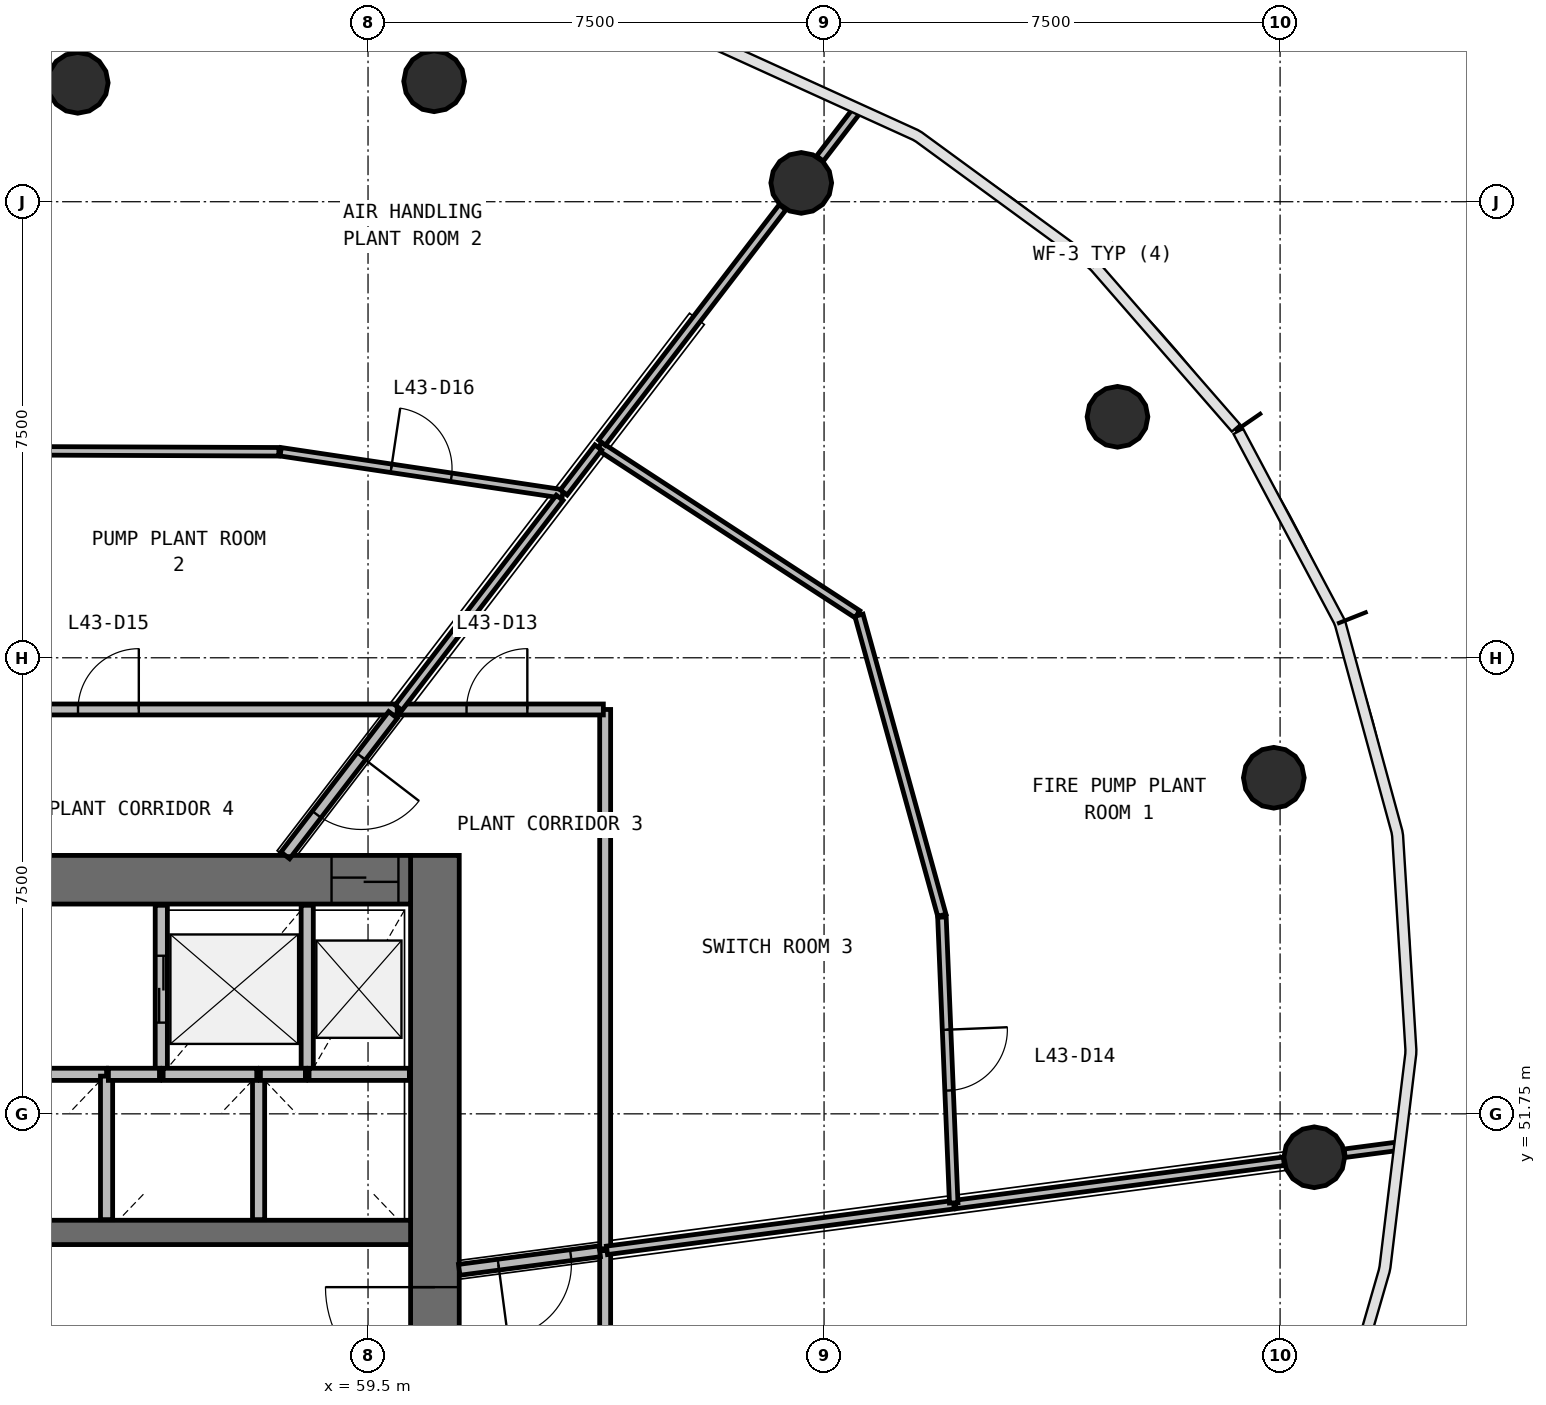
"""IFC4 building model, lengths in metres.
Left out: names, types, materials, properties, quantities, classifications, styles, units other than length and angle.
Written with IfcOpenShell. Run it as: python <this file> out.ifc"""

import sys

from ifc_helpers import new_model, si_unit, direction, frame, frame_2d, origin, origin_2d, place, context, subcontext, project, spatial, rectangle, circle, extrude, source, transform, mapped, element, fill, save


model = new_model("IFC4")
c1 = context("Model", 3, precision=1e-05, world=origin(), true_north=direction((0.0, 1.0)))
c2 = subcontext(c1, "Body", "Model", "MODEL_VIEW")
j1 = project(units=[si_unit("LENGTHUNIT", "METRE"), si_unit("PLANEANGLEUNIT", "RADIAN")], contexts=[c1])
p1 = place(None, origin())
s1 = spatial("IfcSite", under=j1, at=p1, CompositionType="ELEMENT")
p2 = place(p1, origin())
s2 = spatial("IfcBuilding", under=s1, at=p2, CompositionType="ELEMENT")
p3 = place(p2, frame((0.0, 0.0, 179.9)))
s3 = spatial("IfcBuildingStorey", under=s2, at=p3, CompositionType="ELEMENT", Elevation=179.9)
p4 = place(p3, frame((60.6, 40.0, 0.0), z_axis=(0.0, 0.0, 1.0), x_axis=(0.0, 1.0, 0.0)))
e1 = element("IfcWall", 1, at=p4, inside=s3, PredefinedType="SHEAR", context=c2, shape_type="SweptSolid", body=[
    extrude(rectangle(XDim=16.0, YDim=0.8, at=frame_2d((8.0, 0.0))), origin(), (0.0, 0.0, 1.0), 3.9),
])
p5 = place(p4, frame((7.1, 0.0, 0.0)))
e2 = element("IfcOpeningElement", 2, at=p5, cuts=e1, PredefinedType="OPENING", context=c2, shape_type="SweptSolid", body=[
    extrude(rectangle(XDim=1.8, YDim=2.1, at=frame_2d((0.9, 1.05))), frame((0.0, 0.41, 0.0), z_axis=(0.0, -1.0, 0.0), x_axis=(1.0, 0.0, 0.0)), (0.0, 0.0, 1.0), 0.82),
])
p6 = place(p3, frame((60.2, 55.6, 0.0), z_axis=(0.0, 0.0, 1.0), x_axis=(-1.0, 0.0, 0.0)))
e3 = element("IfcWall", 3, at=p6, inside=s3, PredefinedType="SHEAR", context=c2, shape_type="SweptSolid", body=[
    extrude(rectangle(XDim=16.4, YDim=0.8, at=frame_2d((8.2, 0.0))), origin(), (0.0, 0.0, 1.0), 3.9),
])
p7 = place(p6, frame((0.2, 0.0, 0.0)))
e4 = element("IfcOpeningElement", 4, at=p7, cuts=e3, PredefinedType="OPENING", context=c2, shape_type="SweptSolid", body=[
    extrude(rectangle(XDim=1.1, YDim=2.1, at=frame_2d((0.55, 1.05))), frame((0.0, 0.41, 0.0), z_axis=(0.0, -1.0, 0.0), x_axis=(1.0, 0.0, 0.0)), (0.0, 0.0, 1.0), 0.82),
])
p8 = place(p6, frame((10.1, 0.0, 0.0)))
e5 = element("IfcOpeningElement", 5, at=p8, cuts=e3, PredefinedType="OPENING", context=c2, shape_type="SweptSolid", body=[
    extrude(rectangle(XDim=1.2, YDim=2.1, at=frame_2d((0.6, 1.05))), frame((0.0, 0.41, 0.0), z_axis=(0.0, -1.0, 0.0), x_axis=(1.0, 0.0, 0.0)), (0.0, 0.0, 1.0), 0.82),
])
p9 = place(p6, frame((7.05, 0.0, 0.0)))
e6 = element("IfcOpeningElement", 6, at=p9, cuts=e3, PredefinedType="OPENING", context=c2, shape_type="SweptSolid", body=[
    extrude(rectangle(XDim=1.1, YDim=2.1, at=frame_2d((0.55, 1.05))), frame((0.0, 0.41, 0.0), z_axis=(0.0, -1.0, 0.0), x_axis=(1.0, 0.0, 0.0)), (0.0, 0.0, 1.0), 0.82),
])
p10 = place(p3, frame((43.8, 49.8, 0.0), z_axis=(0.0, 0.0, 1.0), x_axis=(1.0, 0.0, 0.0)))
e7 = element("IfcWall", 7, at=p10, inside=s3, PredefinedType="SHEAR", context=c2, shape_type="SweptSolid", body=[
    extrude(rectangle(XDim=16.4, YDim=0.4, at=frame_2d((8.2, 0.0))), origin(), (0.0, 0.0, 1.0), 3.9),
])
p11 = place(p10, frame((3.45, 0.0, 0.0)))
e8 = element("IfcOpeningElement", 8, at=p11, cuts=e7, PredefinedType="OPENING", context=c2, shape_type="SweptSolid", body=[
    extrude(rectangle(XDim=0.9, YDim=2.1, at=frame_2d((0.45, 1.05))), frame((0.0, 0.21, 0.0), z_axis=(0.0, -1.0, 0.0), x_axis=(1.0, 0.0, 0.0)), (0.0, 0.0, 1.0), 0.42),
])
p12 = place(p10, frame((7.65, 0.0, 0.0)))
e9 = element("IfcOpeningElement", 9, at=p12, cuts=e7, PredefinedType="OPENING", context=c2, shape_type="SweptSolid", body=[
    extrude(rectangle(XDim=0.9, YDim=2.1, at=frame_2d((0.45, 1.05))), frame((0.0, 0.21, 0.0), z_axis=(0.0, -1.0, 0.0), x_axis=(1.0, 0.0, 0.0)), (0.0, 0.0, 1.0), 0.42),
])
m1 = source(origin(), c2, "Body", "SweptSolid", [
    extrude(circle(Radius=0.5, at=origin_2d()), origin(), (0.0, 0.0, 1.0), 3.58),
])
for number, where, z_axis, x_axis in (
    (10, (75.062, 51.036, 0.0), (0.0, 0.0, 1.0), (1.0, 0.0, 0.0)),
    (11, (74.397, 57.277, 0.0), (0.0, 0.0, 1.0), (1.0, 0.0, 0.0)),
    (12, (71.826, 63.213, 0.0), (0.0, 0.0, 1.0), (1.0, 0.0, 0.0)),
    (13, (66.625, 67.06, 0.0), (0.0, 0.0, 1.0), (1.0, 0.0, 0.0)),
    (14, (60.587, 68.731, 0.0), (0.0, 0.0, 1.0), (1.0, 0.0, 0.0)),
    (15, (54.726, 68.705, 0.0), (0.0, 0.0, 1.0), (1.0, 0.0, 0.0)),
):
    element("IfcColumn", number, at=place(p3, frame(where, z_axis=z_axis, x_axis=x_axis)), inside=s3, PredefinedType="COLUMN", context=c2, shape_type="MappedRepresentation", body=[
        mapped(m1, transform((0.0, 0.0, 0.0), scale=1.0)),
    ])
p13 = place(p3, frame((56.1, 55.18, 0.0), z_axis=(0.0, 0.0, 1.0), x_axis=(0.0, -1.0, 0.0)))
e16 = element("IfcWall", 16, at=p13, inside=s3, PredefinedType="SOLIDWALL", context=c2, shape_type="SweptSolid", body=[
    extrude(rectangle(XDim=2.78, YDim=0.2, at=frame_2d((1.39, 0.0))), origin(), (0.0, 0.0, 1.0), 3.58),
])
p14 = place(p13, frame((0.83, 0.0, 0.0)))
e17 = element("IfcOpeningElement", 17, at=p14, cuts=e16, PredefinedType="OPENING", context=c2, shape_type="SweptSolid", body=[
    extrude(rectangle(XDim=1.1, YDim=2.1, at=frame_2d((0.55, 1.05))), frame((0.0, 0.11, 0.0), z_axis=(0.0, -1.0, 0.0), x_axis=(1.0, 0.0, 0.0)), (0.0, 0.0, 1.0), 0.22),
])
p15 = place(p3, frame((58.5, 52.4, 0.0), z_axis=(0.0, 0.0, 1.0), x_axis=(0.0, 1.0, 0.0)))
e18 = element("IfcWall", 18, at=p15, inside=s3, PredefinedType="SOLIDWALL", context=c2, shape_type="SweptSolid", body=[
    extrude(rectangle(XDim=2.78, YDim=0.2, at=frame_2d((1.39, 0.0))), origin(), (0.0, 0.0, 1.0), 3.58),
])
p16 = place(p3, frame((55.2, 52.4, 0.0), z_axis=(0.0, 0.0, 1.0), x_axis=(-1.0, 0.0, 0.0)))
e19 = element("IfcWall", 19, at=p16, inside=s3, PredefinedType="SOLIDWALL", context=c2, shape_type="SweptSolid", body=[
    extrude(rectangle(XDim=2.5, YDim=0.2, at=frame_2d((1.25, 0.0))), origin(), (0.0, 0.0, 1.0), 3.58),
])
p17 = place(p3, frame((55.2, 50.01, 0.0), z_axis=(0.0, 0.0, 1.0), x_axis=(0.0, 1.0, 0.0)))
e20 = element("IfcWall", 20, at=p17, inside=s3, PredefinedType="SOLIDWALL", context=c2, shape_type="SweptSolid", body=[
    extrude(rectangle(XDim=2.36, YDim=0.2, at=frame_2d((1.18, 0.0))), origin(), (0.0, 0.0, 1.0), 3.58),
])
p18 = place(p3, frame((57.7, 50.01, 0.0), z_axis=(0.0, 0.0, 1.0), x_axis=(0.0, 1.0, 0.0)))
e21 = element("IfcWall", 21, at=p18, inside=s3, PredefinedType="SOLIDWALL", context=c2, shape_type="SweptSolid", body=[
    extrude(rectangle(XDim=2.39, YDim=0.2, at=frame_2d((1.195, 0.0))), origin(), (0.0, 0.0, 1.0), 3.58),
])
p19 = place(p3, frame((60.18, 52.4, 0.0), z_axis=(0.0, 0.0, 1.0), x_axis=(-1.0, 0.0, 0.0)))
e22 = element("IfcWall", 22, at=p19, inside=s3, PredefinedType="SOLIDWALL", context=c2, shape_type="SweptSolid", body=[
    extrude(rectangle(XDim=1.65, YDim=0.2, at=frame_2d((0.825, 0.0))), origin(), (0.0, 0.0, 1.0), 3.58),
])
p20 = place(p3, frame((57.67, 52.4, 0.0), z_axis=(0.0, 0.0, 1.0), x_axis=(-1.0, 0.0, 0.0)))
e23 = element("IfcWall", 23, at=p20, inside=s3, PredefinedType="SOLIDWALL", context=c2, shape_type="SweptSolid", body=[
    extrude(rectangle(XDim=1.54, YDim=0.2, at=frame_2d((0.77, 0.0))), origin(), (0.0, 0.0, 1.0), 3.58),
])
p21 = place(p3, frame((56.07, 52.4, 0.0), z_axis=(0.0, 0.0, 1.0), x_axis=(-1.0, 0.0, 0.0)))
e24 = element("IfcWall", 24, at=p21, inside=s3, PredefinedType="SOLIDWALL", context=c2, shape_type="SweptSolid", body=[
    extrude(rectangle(XDim=0.84, YDim=0.2, at=frame_2d((0.42, 0.0))), origin(), (0.0, 0.0, 1.0), 3.58),
])
p22 = place(p3, frame((58.47, 52.4, 0.0), z_axis=(0.0, 0.0, 1.0), x_axis=(-1.0, 0.0, 0.0)))
e25 = element("IfcWall", 25, at=p22, inside=s3, PredefinedType="SOLIDWALL", context=c2, shape_type="SweptSolid", body=[
    extrude(rectangle(XDim=0.74, YDim=0.2, at=frame_2d((0.37, 0.0))), origin(), (0.0, 0.0, 1.0), 3.58),
])
p23 = place(p3, frame((63.4, 49.501, 0.0), z_axis=(0.0, 0.0, 1.0), x_axis=(0.0, -1.0, 0.0)))
e26 = element("IfcWall", 26, at=p23, inside=s3, PredefinedType="PARTITIONING", context=c2, shape_type="SweptSolid", body=[
    extrude(rectangle(XDim=10.248, YDim=0.18, at=frame_2d((5.124, 0.0))), origin(), (0.0, 0.0, 1.0), 2.38),
])
p24 = place(p23, frame((4.598, 0.0, 0.0)))
e27 = element("IfcOpeningElement", 27, at=p24, cuts=e26, PredefinedType="OPENING", context=c2, shape_type="SweptSolid", body=[
    extrude(rectangle(XDim=1.0, YDim=2.1, at=frame_2d((0.5, 1.05))), frame((0.0, 0.1, 0.0), z_axis=(0.0, -1.0, 0.0), x_axis=(1.0, 0.0, 0.0)), (0.0, 0.0, 1.0), 0.2),
])
p25 = place(p3, frame((50.661, 58.4, 0.0), z_axis=(0.0, 0.0, 1.0), x_axis=(1.0, 0.0, 0.0)))
e28 = element("IfcWall", 28, at=p25, inside=s3, PredefinedType="PARTITIONING", context=c2, shape_type="SweptSolid", body=[
    extrude(rectangle(XDim=9.319, YDim=0.18, at=frame_2d((4.66, 0.0))), origin(), (0.0, 0.0, 1.0), 2.38),
])
p26 = place(p25, frame((4.069, 0.0, 0.0)))
e29 = element("IfcOpeningElement", 29, at=p26, cuts=e28, PredefinedType="OPENING", context=c2, shape_type="SweptSolid", body=[
    extrude(rectangle(XDim=1.0, YDim=2.1, at=frame_2d((0.5, 1.05))), frame((0.0, 0.1, 0.0), z_axis=(0.0, -1.0, 0.0), x_axis=(1.0, 0.0, 0.0)), (0.0, 0.0, 1.0), 0.2),
])
p27 = place(p3, frame((63.4, 49.531, 0.0), z_axis=(0.0, 0.0, 1.0), x_axis=(0.0, 1.0, 0.0)))
e30 = element("IfcWall", 30, at=p27, inside=s3, PredefinedType="PARTITIONING", context=c2, shape_type="SweptSolid", body=[
    extrude(rectangle(XDim=8.869, YDim=0.18, at=frame_2d((4.435, 0.0))), origin(), (0.0, 0.0, 1.0), 2.38),
])
p28 = place(p3, frame((60.01, 58.4, 0.0), z_axis=(0.0, 0.0, 1.0), x_axis=(1.0, 0.0, 0.0)))
e31 = element("IfcWall", 31, at=p28, inside=s3, PredefinedType="PARTITIONING", context=c2, shape_type="SweptSolid", body=[
    extrude(rectangle(XDim=3.36, YDim=0.18, at=frame_2d((1.68, 0.0))), origin(), (0.0, 0.0, 1.0), 2.38),
])
p29 = place(p28, frame((1.11, 0.0, 0.0)))
e32 = element("IfcOpeningElement", 32, at=p29, cuts=e31, PredefinedType="OPENING", context=c2, shape_type="SweptSolid", body=[
    extrude(rectangle(XDim=1.0, YDim=2.1, at=frame_2d((0.5, 1.05))), frame((0.0, 0.1, 0.0), z_axis=(0.0, -1.0, 0.0), x_axis=(1.0, 0.0, 0.0)), (0.0, 0.0, 1.0), 0.2),
])
p30 = place(p3, frame((59.911, 58.31, 0.0), z_axis=(0.0, 0.0, 1.0), x_axis=(-0.608737787706, -0.793371480341, 0.0)))
e33 = element("IfcWall", 33, at=p30, inside=s3, PredefinedType="PARTITIONING", context=c2, shape_type="SweptSolid", body=[
    extrude(rectangle(XDim=2.912, YDim=0.18, at=frame_2d((1.456, 0.0))), origin(), (0.0, 0.0, 1.0), 2.38),
])
p31 = place(p30, frame((0.862, 0.0, 0.0)))
e34 = element("IfcOpeningElement", 34, at=p31, cuts=e33, PredefinedType="OPENING", context=c2, shape_type="SweptSolid", body=[
    extrude(rectangle(XDim=1.2, YDim=2.1, at=frame_2d((0.6, 1.05))), frame((0.0, 0.1, 0.0), z_axis=(0.0, -1.0, 0.0), x_axis=(1.0, 0.0, 0.0)), (0.0, 0.0, 1.0), 0.2),
])
p32 = place(p3, frame((63.31, 49.489, 0.0), z_axis=(0.0, 0.0, 1.0), x_axis=(-0.991440737811, -0.130557509967, 0.0)))
e35 = element("IfcWall", 35, at=p32, inside=s3, PredefinedType="PARTITIONING", context=c2, shape_type="SweptSolid", body=[
    extrude(rectangle(XDim=2.33, YDim=0.18, at=frame_2d((1.165, 0.0))), origin(), (0.0, 0.0, 1.0), 2.38),
])
p33 = place(p32, frame((0.48, 0.0, 0.0)))
e36 = element("IfcOpeningElement", 36, at=p33, cuts=e35, PredefinedType="OPENING", context=c2, shape_type="SweptSolid", body=[
    extrude(rectangle(XDim=1.2, YDim=2.1, at=frame_2d((0.6, 1.05))), frame((0.0, 0.1, 0.0), z_axis=(0.0, -1.0, 0.0), x_axis=(1.0, 0.0, 0.0)), (0.0, 0.0, 1.0), 0.2),
])
p34 = place(p3, frame((63.43, 49.505, 0.0), z_axis=(0.0, 0.0, 1.0), x_axis=(0.991449239368, 0.130492933744, 0.0)))
e37 = element("IfcWall", 37, at=p34, inside=s3, PredefinedType="PARTITIONING", context=c2, shape_type="SweptSolid", body=[
    extrude(rectangle(XDim=5.753, YDim=0.14, at=frame_2d((2.876, 0.0))), origin(), (0.0, 0.0, 1.0), 2.38),
])
p35 = place(p3, frame((69.163, 50.26, 0.0), z_axis=(0.0, 0.0, 1.0), x_axis=(0.99144696925, 0.130510180315, 0.0)))
e38 = element("IfcWall", 38, at=p35, inside=s3, PredefinedType="PARTITIONING", context=c2, shape_type="SweptSolid", body=[
    extrude(rectangle(XDim=5.446, YDim=0.14, at=frame_2d((2.723, 0.0))), origin(), (0.0, 0.0, 1.0), 2.38),
])
p36 = place(p3, frame((68.937, 55.016, 0.0), z_axis=(0.0, 0.0, 1.0), x_axis=(-0.266340043195, 0.963879132148, 0.0)))
e39 = element("IfcWall", 39, at=p36, inside=s3, PredefinedType="PARTITIONING", context=c2, shape_type="SweptSolid", body=[
    extrude(rectangle(XDim=5.119, YDim=0.14, at=frame_2d((2.56, 0.0))), origin(), (0.0, 0.0, 1.0), 2.38),
])
p37 = place(p3, frame((67.549, 59.967, 0.0), z_axis=(0.0, 0.0, 1.0), x_axis=(-0.837722756829, 0.546095763297, 0.0)))
e40 = element("IfcWall", 40, at=p37, inside=s3, PredefinedType="PARTITIONING", context=c2, shape_type="SweptSolid", body=[
    extrude(rectangle(XDim=5.066, YDim=0.14, at=frame_2d((2.533, 0.0))), origin(), (0.0, 0.0, 1.0), 2.38),
])
p38 = place(p3, frame((63.348, 62.789, 0.0), z_axis=(0.0, 0.0, 1.0), x_axis=(0.608786560107, 0.793334055889, 0.0)))
e41 = element("IfcWall", 41, at=p38, inside=s3, PredefinedType="PARTITIONING", context=c2, shape_type="SweptSolid", body=[
    extrude(rectangle(XDim=4.879, YDim=0.14, at=frame_2d((2.439, 0.0))), origin(), (0.0, 0.0, 1.0), 2.38),
])
p39 = place(p3, frame((68.938, 54.986, 0.0), z_axis=(0.0, 0.0, 1.0), x_axis=(0.041209574391, -0.999150524685, 0.0)))
e42 = element("IfcWall", 42, at=p39, inside=s3, PredefinedType="PARTITIONING", context=c2, shape_type="SweptSolid", body=[
    extrude(rectangle(XDim=4.704, YDim=0.14, at=frame_2d((2.352, 0.0))), origin(), (0.0, 0.0, 1.0), 2.38),
])
p40 = place(p39, frame((1.854, 0.0, 0.0)))
e43 = element("IfcOpeningElement", 43, at=p40, cuts=e42, PredefinedType="OPENING", context=c2, shape_type="SweptSolid", body=[
    extrude(rectangle(XDim=1.0, YDim=2.1, at=frame_2d((0.5, 1.05))), frame((0.0, 0.08, 0.0), z_axis=(0.0, -1.0, 0.0), x_axis=(1.0, 0.0, 0.0)), (0.0, 0.0, 1.0), 0.16),
])
p41 = place(p3, frame((58.063, 62.638, 0.0), z_axis=(0.0, 0.0, 1.0), x_axis=(0.989020980415, -0.147775168075, 0.0)))
e44 = element("IfcWall", 44, at=p41, inside=s3, PredefinedType="PARTITIONING", context=c2, shape_type="SweptSolid", body=[
    extrude(rectangle(XDim=4.689, YDim=0.14, at=frame_2d((2.344, 0.0))), origin(), (0.0, 0.0, 1.0), 2.38),
])
p42 = place(p41, frame((1.839, 0.0, 0.0)))
e45 = element("IfcOpeningElement", 45, at=p42, cuts=e44, PredefinedType="OPENING", context=c2, shape_type="SweptSolid", body=[
    extrude(rectangle(XDim=1.0, YDim=2.1, at=frame_2d((0.5, 1.05))), frame((0.0, 0.08, 0.0), z_axis=(0.0, -1.0, 0.0), x_axis=(1.0, 0.0, 0.0)), (0.0, 0.0, 1.0), 0.16),
])
p43 = place(p3, frame((60.002, 58.429, 0.0), z_axis=(0.0, 0.0, 1.0), x_axis=(0.608742422759, 0.793367923938, 0.0)))
e46 = element("IfcWall", 46, at=p43, inside=s3, PredefinedType="PARTITIONING", context=c2, shape_type="SweptSolid", body=[
    extrude(rectangle(XDim=4.352, YDim=0.14, at=frame_2d((2.176, 0.0))), origin(), (0.0, 0.0, 1.0), 2.38),
])
p44 = place(p3, frame((58.033, 62.638, 0.0), z_axis=(0.0, 0.0, 1.0), x_axis=(-0.999992752474, 0.003807229992, 0.0)))
e47 = element("IfcWall", 47, at=p44, inside=s3, PredefinedType="PARTITIONING", context=c2, shape_type="SweptSolid", body=[
    extrude(rectangle(XDim=4.104, YDim=0.14, at=frame_2d((2.052, 0.0))), origin(), (0.0, 0.0, 1.0), 2.38),
])
p45 = place(p3, frame((62.719, 61.969, 0.0), z_axis=(0.0, 0.0, 1.0), x_axis=(0.608673237445, 0.793421004271, 0.0)))
e48 = element("IfcWall", 48, at=p45, inside=s3, PredefinedType="PARTITIONING", context=c2, shape_type="SweptSolid", body=[
    extrude(rectangle(XDim=0.933, YDim=0.14, at=frame_2d((0.466, 0.0))), origin(), (0.0, 0.0, 1.0), 2.38),
])
p46 = place(p3, frame((66.932, 67.46, 0.0), z_axis=(0.0, 0.0, 1.0), x_axis=(0.608854774338, 0.793281705175, 0.0)))
e49 = element("IfcWall", 49, at=p46, inside=s3, PredefinedType="PARTITIONING", context=c2, shape_type="SweptSolid", body=[
    extrude(rectangle(XDim=0.993, YDim=0.14, at=frame_2d((0.497, 0.0))), origin(), (0.0, 0.0, 1.0), 2.88),
])
p47 = place(p3, frame((75.562, 51.102, 0.0), z_axis=(0.0, 0.0, 1.0), x_axis=(0.991459985339, 0.130411262827, 0.0)))
e50 = element("IfcWall", 50, at=p47, inside=s3, PredefinedType="PARTITIONING", context=c2, shape_type="SweptSolid", body=[
    extrude(rectangle(XDim=0.876, YDim=0.14, at=frame_2d((0.438, 0.0))), origin(), (0.0, 0.0, 1.0), 2.88),
])
m2 = source(origin(), c2, "Body", "SweptSolid", [
    extrude(rectangle(XDim=1.8, YDim=2.1, at=frame_2d((0.9, 1.05))), frame((0.0, 0.025, 0.0), z_axis=(0.0, -1.0, 0.0), x_axis=(1.0, 0.0, 0.0)), (0.0, 0.0, 1.0), 0.05),
])
p48 = place(p5, origin())
e51 = element("IfcDoor", 51, at=p48, inside=s3, OperationType="SINGLE_SWING_RIGHT", PredefinedType="DOOR", context=c2, shape_type="MappedRepresentation", body=[
    mapped(m2, transform((0.0, 0.0, 0.0), scale=1.0)),
])
fill(e2, e51)
m3 = source(origin(), c2, "Body", "SweptSolid", [
    extrude(rectangle(XDim=1.1, YDim=2.1, at=frame_2d((0.55, 1.05))), frame((0.0, 0.025, 0.0), z_axis=(0.0, -1.0, 0.0), x_axis=(1.0, 0.0, 0.0)), (0.0, 0.0, 1.0), 0.05),
])
p49 = place(p14, origin())
e52 = element("IfcDoor", 52, at=p49, inside=s3, OperationType="DOUBLE_DOOR_SLIDING", PredefinedType="USERDEFINED", context=c2, shape_type="MappedRepresentation", body=[
    mapped(m3, transform((0.0, 0.0, 0.0), scale=1.0)),
])
fill(e17, e52)
p50 = place(p7, origin())
e53 = element("IfcDoor", 53, at=p50, inside=s3, OperationType="DOUBLE_DOOR_SLIDING", PredefinedType="USERDEFINED", context=c2, shape_type="MappedRepresentation", body=[
    mapped(m3, transform((0.0, 0.0, 0.0), scale=1.0)),
])
fill(e4, e53)
m4 = source(origin(), c2, "Body", "SweptSolid", [
    extrude(rectangle(XDim=1.0, YDim=2.1, at=frame_2d((0.5, 1.05))), frame((0.0, 0.025, 0.0), z_axis=(0.0, -1.0, 0.0), x_axis=(1.0, 0.0, 0.0)), (0.0, 0.0, 1.0), 0.05),
])
p51 = place(p29, origin())
e54 = element("IfcDoor", 54, at=p51, inside=s3, OperationType="SINGLE_SWING_RIGHT", PredefinedType="DOOR", context=c2, shape_type="MappedRepresentation", body=[
    mapped(m4, transform((0.0, 0.0, 0.0), scale=1.0)),
])
fill(e32, e54)
p52 = place(p40, origin())
e55 = element("IfcDoor", 55, at=p52, inside=s3, OperationType="SINGLE_SWING_LEFT", PredefinedType="DOOR", context=c2, shape_type="MappedRepresentation", body=[
    mapped(m4, transform((0.0, 0.0, 0.0), scale=1.0)),
])
fill(e43, e55)
p53 = place(p26, origin())
e56 = element("IfcDoor", 56, at=p53, inside=s3, OperationType="SINGLE_SWING_RIGHT", PredefinedType="DOOR", context=c2, shape_type="MappedRepresentation", body=[
    mapped(m4, transform((0.0, 0.0, 0.0), scale=1.0)),
])
fill(e29, e56)
p54 = place(p42, origin())
e57 = element("IfcDoor", 57, at=p54, inside=s3, OperationType="SINGLE_SWING_LEFT", PredefinedType="DOOR", context=c2, shape_type="MappedRepresentation", body=[
    mapped(m4, transform((0.0, 0.0, 0.0), scale=1.0)),
])
fill(e45, e57)
m5 = source(origin(), c2, "Body", "SweptSolid", [
    extrude(rectangle(XDim=1.2, YDim=2.1, at=frame_2d((0.6, 1.05))), frame((0.0, 0.025, 0.0), z_axis=(0.0, -1.0, 0.0), x_axis=(1.0, 0.0, 0.0)), (0.0, 0.0, 1.0), 0.05),
])
p55 = place(p31, origin())
e58 = element("IfcDoor", 58, at=p55, inside=s3, OperationType="SINGLE_SWING_LEFT", PredefinedType="DOOR", context=c2, shape_type="MappedRepresentation", body=[
    mapped(m5, transform((0.0, 0.0, 0.0), scale=1.0)),
])
fill(e34, e58)
p56 = place(p33, origin())
e59 = element("IfcDoor", 59, at=p56, inside=s3, OperationType="SINGLE_SWING_RIGHT", PredefinedType="DOOR", context=c2, shape_type="MappedRepresentation", body=[
    mapped(m5, transform((0.0, 0.0, 0.0), scale=1.0)),
])
fill(e36, e59)
save(model, sys.argv[1])
